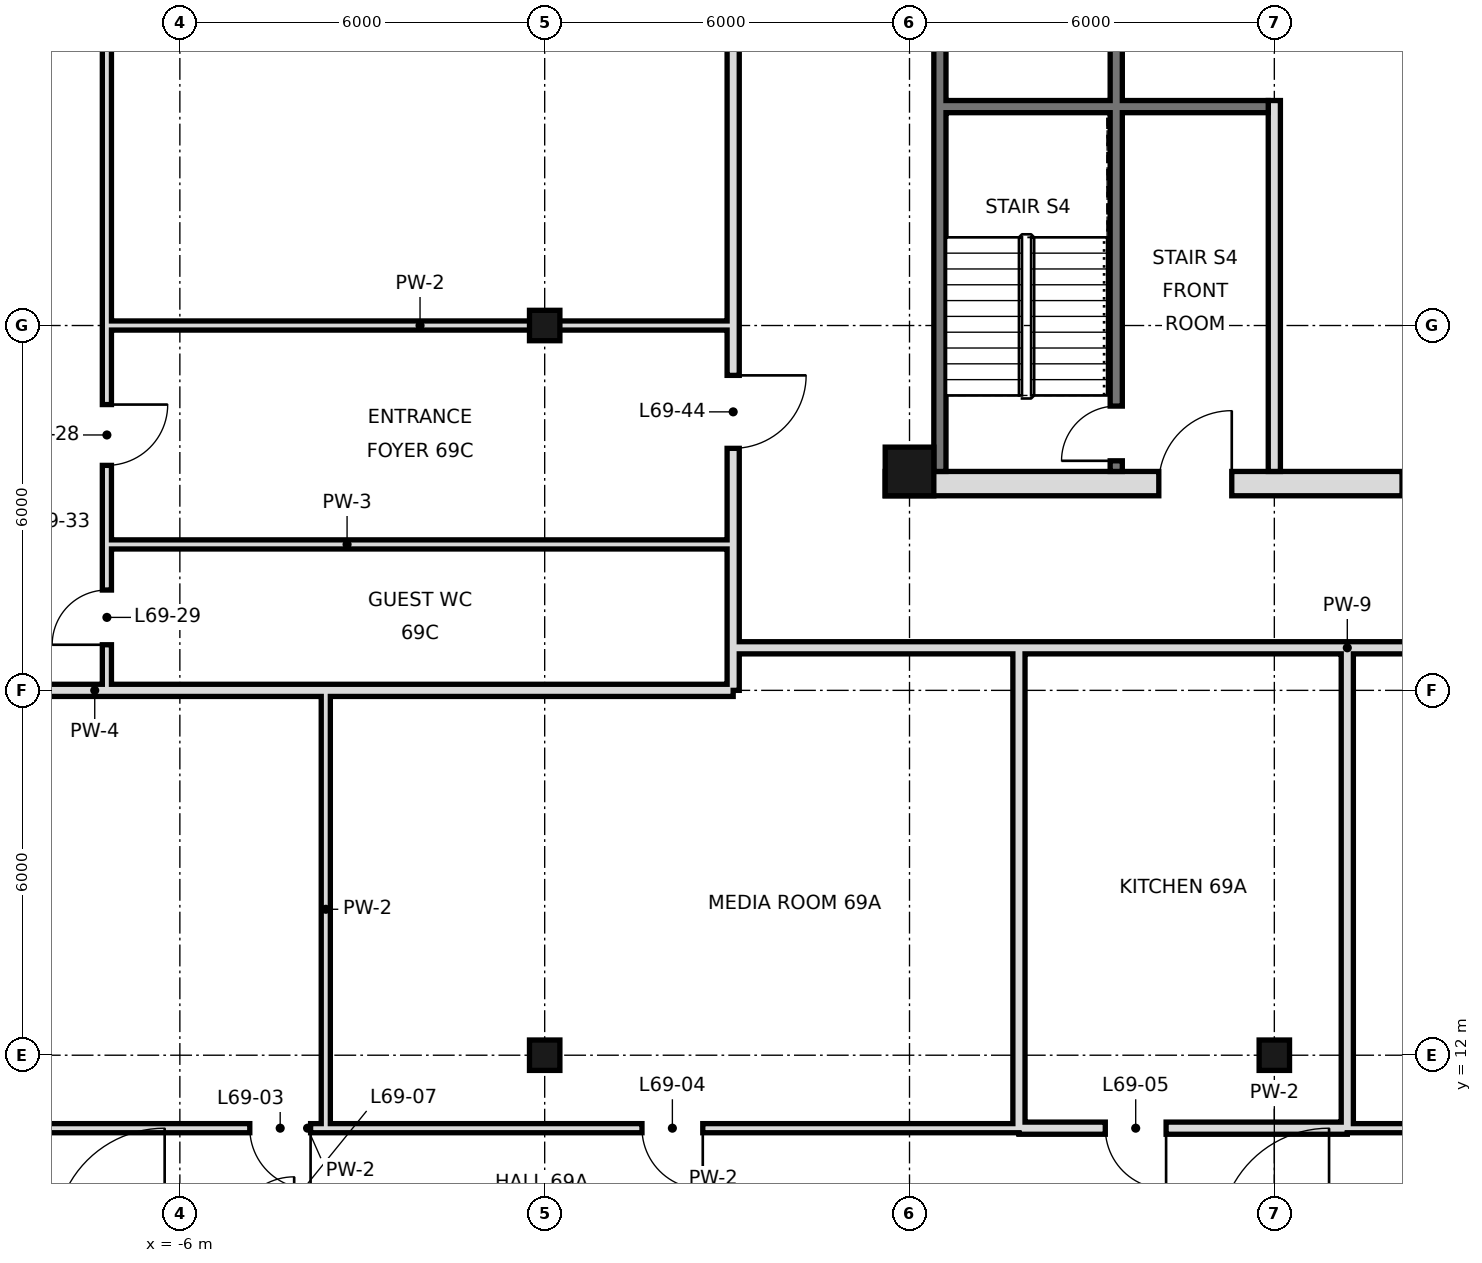
"""IFC4 building model, lengths in metres.
Left out: names, types, materials, properties, quantities, classifications, styles, units other than length and angle.
Written with IfcOpenShell. Run it as: python <this file> out.ifc"""

import sys

from ifc_helpers import new_model, si_unit, direction, frame, frame_2d, origin, origin_2d, place, context, subcontext, project, spatial, rectangle, hollow_rectangle, extrude, element, fill, save


model = new_model("IFC4")
c1 = context("Model", 3, precision=1e-05, world=origin(), true_north=direction((0.0, 1.0)))
c2 = subcontext(c1, "Body", "Model", "MODEL_VIEW")
j1 = project(units=[si_unit("LENGTHUNIT", "METRE"), si_unit("PLANEANGLEUNIT", "RADIAN")], contexts=[c1])
p1 = place(None, origin())
s1 = spatial("IfcSite", under=j1, at=p1, CompositionType="ELEMENT")
p2 = place(p1, origin())
s2 = spatial("IfcBuilding", under=s1, at=p2, CompositionType="ELEMENT")
p3 = place(p2, frame((0.0, 0.0, 294.4)))
s3 = spatial("IfcBuildingStorey", under=s2, at=p3, CompositionType="ELEMENT", Elevation=294.4)
for number, where, z_axis, x_axis in (
    (1, (0.0, 12.0, 0.0), (0.0, 0.0, 1.0), (1.0, 0.0, 0.0)),
    (2, (0.0, 24.0, 0.0), (0.0, 0.0, 1.0), (1.0, 0.0, 0.0)),
):
    element("IfcColumn", number, at=place(p3, frame(where, z_axis=z_axis, x_axis=x_axis)), inside=s3, PredefinedType="COLUMN", context=c2, shape_type="SweptSolid", body=[
        extrude(hollow_rectangle(XDim=0.5, YDim=0.5, WallThickness=0.025, at=origin_2d()), origin(), (0.0, 0.0, 1.0), 3.6),
    ])
p4 = place(p3, frame((6.0, 21.6, 0.0), z_axis=(0.0, 0.0, 1.0), x_axis=(1.0, 0.0, 0.0)))
e3 = element("IfcColumn", 3, at=p4, inside=s3, PredefinedType="COLUMN", context=c2, shape_type="SweptSolid", body=[
    extrude(hollow_rectangle(XDim=0.8, YDim=0.8, WallThickness=0.032, at=origin_2d()), origin(), (0.0, 0.0, 1.0), 3.6),
])
p5 = place(p3, frame((12.0, 12.0, 0.0), z_axis=(0.0, 0.0, 1.0), x_axis=(1.0, 0.0, 0.0)))
e4 = element("IfcColumn", 4, at=p5, inside=s3, PredefinedType="COLUMN", context=c2, shape_type="SweptSolid", body=[
    extrude(hollow_rectangle(XDim=0.5, YDim=0.5, WallThickness=0.025, at=origin_2d()), origin(), (0.0, 0.0, 1.0), 3.6),
])
p6 = place(p3, frame((-3.6, 10.8, 0.0), z_axis=(0.0, 0.0, 1.0), x_axis=(0.0, 1.0, 0.0)))
e5 = element("IfcWall", 5, at=p6, inside=s3, PredefinedType="PARTITIONING", context=c2, shape_type="SweptSolid", body=[
    extrude(rectangle(XDim=7.2, YDim=0.15, at=frame_2d((3.6, 0.0))), origin(), (0.0, 0.0, 1.0), 3.42),
])
p7 = place(p3, frame((-7.2, 20.4, 0.0), z_axis=(0.0, 0.0, 1.0), x_axis=(0.0, 1.0, 0.0)))
e6 = element("IfcWall", 6, at=p7, inside=s3, PredefinedType="PARTITIONING", context=c2, shape_type="SweptSolid", body=[
    extrude(rectangle(XDim=23.4, YDim=0.15, at=frame_2d((11.7, 0.0))), origin(), (0.0, 0.0, 1.0), 3.42),
])
p8 = place(p7, frame((1.3, 0.0, 0.0)))
e7 = element("IfcOpeningElement", 7, at=p8, cuts=e6, PredefinedType="OPENING", context=c2, shape_type="SweptSolid", body=[
    extrude(rectangle(XDim=1.0, YDim=2.4, at=frame_2d((0.5, 1.2))), frame((0.0, 0.085, 0.0), z_axis=(0.0, -1.0, 0.0), x_axis=(1.0, 0.0, 0.0)), (0.0, 0.0, 1.0), 0.17),
])
p9 = place(p7, frame((11.2, 0.0, 0.0)))
e8 = element("IfcOpeningElement", 8, at=p9, cuts=e6, PredefinedType="OPENING", context=c2, shape_type="SweptSolid", body=[
    extrude(rectangle(XDim=1.0, YDim=2.4, at=frame_2d((0.5, 1.2))), frame((0.0, 0.085, 0.0), z_axis=(0.0, -1.0, 0.0), x_axis=(1.0, 0.0, 0.0)), (0.0, 0.0, 1.0), 0.17),
])
p10 = place(p7, frame((17.74, 0.0, 0.0)))
e9 = element("IfcOpeningElement", 9, at=p10, cuts=e6, PredefinedType="OPENING", context=c2, shape_type="SweptSolid", body=[
    extrude(rectangle(XDim=1.0, YDim=2.4, at=frame_2d((0.5, 1.2))), frame((0.0, 0.085, 0.0), z_axis=(0.0, -1.0, 0.0), x_axis=(1.0, 0.0, 0.0)), (0.0, 0.0, 1.0), 0.17),
])
p11 = place(p3, frame((-7.2, 18.0, 0.0), z_axis=(0.0, 0.0, 1.0), x_axis=(0.0, 1.0, 0.0)))
e10 = element("IfcWall", 10, at=p11, inside=s3, PredefinedType="PARTITIONING", context=c2, shape_type="SweptSolid", body=[
    extrude(rectangle(XDim=2.4, YDim=0.15, at=frame_2d((1.2, 0.0))), origin(), (0.0, 0.0, 1.0), 3.42),
])
p12 = place(p11, frame((0.75, 0.0, 0.0)))
e11 = element("IfcOpeningElement", 11, at=p12, cuts=e10, PredefinedType="OPENING", context=c2, shape_type="SweptSolid", body=[
    extrude(rectangle(XDim=0.9, YDim=2.4, at=frame_2d((0.45, 1.2))), frame((0.0, 0.085, 0.0), z_axis=(0.0, -1.0, 0.0), x_axis=(1.0, 0.0, 0.0)), (0.0, 0.0, 1.0), 0.17),
])
p13 = place(p3, frame((13.2, 10.8, 0.0), z_axis=(0.0, 0.0, 1.0), x_axis=(0.0, 1.0, 0.0)))
e12 = element("IfcWall", 12, at=p13, inside=s3, PredefinedType="SOLIDWALL", context=c2, shape_type="SweptSolid", body=[
    extrude(rectangle(XDim=7.9, YDim=0.2, at=frame_2d((3.95, 0.0))), origin(), (0.0, 0.0, 1.0), 2.72),
])
p14 = place(p3, frame((3.1, 18.7, 0.0), z_axis=(0.0, 0.0, 1.0), x_axis=(0.0, 1.0, 0.0)))
e13 = element("IfcWall", 13, at=p14, inside=s3, PredefinedType="SOLIDWALL", context=c2, shape_type="SweptSolid", body=[
    extrude(rectangle(XDim=25.1, YDim=0.2, at=frame_2d((12.55, 0.0))), origin(), (0.0, 0.0, 1.0), 2.97),
])
p15 = place(p14, frame((3.28, 0.0, 0.0)))
e14 = element("IfcOpeningElement", 14, at=p15, cuts=e13, PredefinedType="OPENING", context=c2, shape_type="SweptSolid", body=[
    extrude(rectangle(XDim=1.2, YDim=2.4, at=frame_2d((0.6, 1.2))), frame((0.0, 0.11, 0.0), z_axis=(0.0, -1.0, 0.0), x_axis=(1.0, 0.0, 0.0)), (0.0, 0.0, 1.0), 0.22),
])
p16 = place(p3, frame((3.1, 18.0, 0.0), z_axis=(0.0, 0.0, 1.0), x_axis=(0.0, 1.0, 0.0)))
e15 = element("IfcWall", 15, at=p16, inside=s3, PredefinedType="SOLIDWALL", context=c2, shape_type="SweptSolid", body=[
    extrude(rectangle(XDim=0.7, YDim=0.2, at=frame_2d((0.35, 0.0))), origin(), (0.0, 0.0, 1.0), 2.97),
])
p17 = place(p3, frame((7.8, 10.8, 0.0), z_axis=(0.0, 0.0, 1.0), x_axis=(0.0, 1.0, 0.0)))
e16 = element("IfcWall", 16, at=p17, inside=s3, PredefinedType="SOLIDWALL", context=c2, shape_type="SweptSolid", body=[
    extrude(rectangle(XDim=7.9, YDim=0.2, at=frame_2d((3.95, 0.0))), origin(), (0.0, 0.0, 1.0), 2.72),
])
p18 = place(p3, frame((7.8, 10.8, 0.0), z_axis=(0.0, 0.0, 1.0), x_axis=(1.0, 0.0, 0.0)))
e17 = element("IfcWall", 17, at=p18, inside=s3, PredefinedType="SOLIDWALL", context=c2, shape_type="SweptSolid", body=[
    extrude(rectangle(XDim=5.4, YDim=0.2, at=frame_2d((2.7, 0.0))), origin(), (0.0, 0.0, 1.0), 2.72),
])
p19 = place(p18, frame((1.42, 0.0, 0.0)))
e18 = element("IfcOpeningElement", 18, at=p19, cuts=e17, PredefinedType="OPENING", context=c2, shape_type="SweptSolid", body=[
    extrude(rectangle(XDim=1.0, YDim=2.4, at=frame_2d((0.5, 1.2))), frame((0.0, 0.11, 0.0), z_axis=(0.0, -1.0, 0.0), x_axis=(1.0, 0.0, 0.0)), (0.0, 0.0, 1.0), 0.22),
])
p20 = place(p3, frame((-15.6, 10.8, 0.0), z_axis=(0.0, 0.0, 1.0), x_axis=(1.0, 0.0, 0.0)))
e19 = element("IfcWall", 19, at=p20, inside=s3, PredefinedType="PARTITIONING", context=c2, shape_type="SweptSolid", body=[
    extrude(rectangle(XDim=23.4, YDim=0.15, at=frame_2d((11.7, 0.0))), origin(), (0.0, 0.0, 1.0), 3.42),
])
p21 = place(p20, frame((10.75, 0.0, 0.0)))
e20 = element("IfcOpeningElement", 20, at=p21, cuts=e19, PredefinedType="OPENING", context=c2, shape_type="SweptSolid", body=[
    extrude(rectangle(XDim=1.0, YDim=2.4, at=frame_2d((0.5, 1.2))), frame((0.0, 0.085, 0.0), z_axis=(0.0, -1.0, 0.0), x_axis=(1.0, 0.0, 0.0)), (0.0, 0.0, 1.0), 0.17),
])
p22 = place(p20, frame((17.2, 0.0, 0.0)))
e21 = element("IfcOpeningElement", 21, at=p22, cuts=e19, PredefinedType="OPENING", context=c2, shape_type="SweptSolid", body=[
    extrude(rectangle(XDim=1.0, YDim=2.4, at=frame_2d((0.5, 1.2))), frame((0.0, 0.085, 0.0), z_axis=(0.0, -1.0, 0.0), x_axis=(1.0, 0.0, 0.0)), (0.0, 0.0, 1.0), 0.17),
])
p23 = place(p3, frame((13.2, 10.8, 0.0), z_axis=(0.0, 0.0, 1.0), x_axis=(1.0, 0.0, 0.0)))
e22 = element("IfcWall", 22, at=p23, inside=s3, PredefinedType="PARTITIONING", context=c2, shape_type="SweptSolid", body=[
    extrude(rectangle(XDim=27.6, YDim=0.15, at=frame_2d((13.8, 0.0))), origin(), (0.0, 0.0, 1.0), 3.42),
])
p24 = place(p23, frame((2.56, 0.0, 0.0)))
e23 = element("IfcOpeningElement", 23, at=p24, cuts=e22, PredefinedType="OPENING", context=c2, shape_type="SweptSolid", body=[
    extrude(rectangle(XDim=1.0, YDim=2.4, at=frame_2d((0.5, 1.2))), frame((0.0, 0.085, 0.0), z_axis=(0.0, -1.0, 0.0), x_axis=(1.0, 0.0, 0.0)), (0.0, 0.0, 1.0), 0.17),
])
p25 = place(p23, frame((16.12, 0.0, 0.0)))
e24 = element("IfcOpeningElement", 24, at=p25, cuts=e22, PredefinedType="OPENING", context=c2, shape_type="SweptSolid", body=[
    extrude(rectangle(XDim=1.0, YDim=2.4, at=frame_2d((0.5, 1.2))), frame((0.0, 0.085, 0.0), z_axis=(0.0, -1.0, 0.0), x_axis=(1.0, 0.0, 0.0)), (0.0, 0.0, 1.0), 0.17),
])
p26 = place(p23, frame((9.1, 0.0, 0.0)))
e25 = element("IfcOpeningElement", 25, at=p26, cuts=e22, PredefinedType="OPENING", context=c2, shape_type="SweptSolid", body=[
    extrude(rectangle(XDim=1.0, YDim=2.4, at=frame_2d((0.5, 1.2))), frame((0.0, 0.085, 0.0), z_axis=(0.0, -1.0, 0.0), x_axis=(1.0, 0.0, 0.0)), (0.0, 0.0, 1.0), 0.17),
])
p27 = place(p23, frame((20.68, 0.0, 0.0)))
e26 = element("IfcOpeningElement", 26, at=p27, cuts=e22, PredefinedType="OPENING", context=c2, shape_type="SweptSolid", body=[
    extrude(rectangle(XDim=1.0, YDim=2.4, at=frame_2d((0.5, 1.2))), frame((0.0, 0.085, 0.0), z_axis=(0.0, -1.0, 0.0), x_axis=(1.0, 0.0, 0.0)), (0.0, 0.0, 1.0), 0.17),
])
p28 = place(p3, frame((-18.6, 18.0, 0.0), z_axis=(0.0, 0.0, 1.0), x_axis=(1.0, 0.0, 0.0)))
e27 = element("IfcWall", 27, at=p28, inside=s3, PredefinedType="SOLIDWALL", context=c2, shape_type="SweptSolid", body=[
    extrude(rectangle(XDim=21.7, YDim=0.2, at=frame_2d((10.85, 0.0))), origin(), (0.0, 0.0, 1.0), 2.72),
])
p29 = place(p3, frame((3.1, 18.7, 0.0), z_axis=(0.0, 0.0, 1.0), x_axis=(1.0, 0.0, 0.0)))
e28 = element("IfcWall", 28, at=p29, inside=s3, PredefinedType="SOLIDWALL", context=c2, shape_type="SweptSolid", body=[
    extrude(rectangle(XDim=4.7, YDim=0.2, at=frame_2d((2.35, 0.0))), origin(), (0.0, 0.0, 1.0), 2.72),
])
p30 = place(p3, frame((13.2, 18.7, 0.0), z_axis=(0.0, 0.0, 1.0), x_axis=(1.0, 0.0, 0.0)))
e29 = element("IfcWall", 29, at=p30, inside=s3, PredefinedType="SOLIDWALL", context=c2, shape_type="SweptSolid", body=[
    extrude(rectangle(XDim=27.6, YDim=0.2, at=frame_2d((13.8, 0.0))), origin(), (0.0, 0.0, 1.0), 2.72),
])
p31 = place(p30, frame((1.8, 0.0, 0.0)))
e30 = element("IfcOpeningElement", 30, at=p31, cuts=e29, PredefinedType="OPENING", context=c2, shape_type="SweptSolid", body=[
    extrude(rectangle(XDim=1.2, YDim=2.4, at=frame_2d((0.6, 1.2))), frame((0.0, 0.11, 0.0), z_axis=(0.0, -1.0, 0.0), x_axis=(1.0, 0.0, 0.0)), (0.0, 0.0, 1.0), 0.22),
])
p32 = place(p30, frame((15.98, 0.0, 0.0)))
e31 = element("IfcOpeningElement", 31, at=p32, cuts=e29, PredefinedType="OPENING", context=c2, shape_type="SweptSolid", body=[
    extrude(rectangle(XDim=1.2, YDim=2.4, at=frame_2d((0.6, 1.2))), frame((0.0, 0.11, 0.0), z_axis=(0.0, -1.0, 0.0), x_axis=(1.0, 0.0, 0.0)), (0.0, 0.0, 1.0), 0.22),
])
p33 = place(p3, frame((7.8, 18.7, 0.0), z_axis=(0.0, 0.0, 1.0), x_axis=(1.0, 0.0, 0.0)))
e32 = element("IfcWall", 32, at=p33, inside=s3, PredefinedType="SOLIDWALL", context=c2, shape_type="SweptSolid", body=[
    extrude(rectangle(XDim=5.4, YDim=0.2, at=frame_2d((2.7, 0.0))), origin(), (0.0, 0.0, 1.0), 3.42),
])
p34 = place(p3, frame((-7.2, 20.4, 0.0), z_axis=(0.0, 0.0, 1.0), x_axis=(1.0, 0.0, 0.0)))
e33 = element("IfcWall", 33, at=p34, inside=s3, PredefinedType="PARTITIONING", context=c2, shape_type="SweptSolid", body=[
    extrude(rectangle(XDim=10.3, YDim=0.15, at=frame_2d((5.15, 0.0))), origin(), (0.0, 0.0, 1.0), 3.42),
])
p35 = place(p3, frame((-7.2, 24.0, 0.0), z_axis=(0.0, 0.0, 1.0), x_axis=(1.0, 0.0, 0.0)))
e34 = element("IfcWall", 34, at=p35, inside=s3, PredefinedType="PARTITIONING", context=c2, shape_type="SweptSolid", body=[
    extrude(rectangle(XDim=10.3, YDim=0.15, at=frame_2d((5.15, 0.0))), origin(), (0.0, 0.0, 1.0), 2.72),
])
p36 = place(p3, frame((6.5, 21.6, 0.0), z_axis=(0.0, 0.0, 1.0), x_axis=(0.0, 1.0, 0.0)))
e35 = element("IfcWall", 35, at=p36, inside=s3, PredefinedType="SOLIDWALL", context=c2, shape_type="SweptSolid", body=[
    extrude(rectangle(XDim=23.5, YDim=0.2, at=frame_2d((11.75, 0.0))), origin(), (0.0, 0.0, 1.0), 3.42),
])
p37 = place(p3, frame((5.6, 21.4, 0.0), z_axis=(0.0, 0.0, 1.0), x_axis=(1.0, 0.0, 0.0)))
e36 = element("IfcWall", 36, at=p37, inside=s3, PredefinedType="SOLIDWALL", context=c2, shape_type="SweptSolid", body=[
    extrude(rectangle(XDim=36.8, YDim=0.4, at=frame_2d((18.4, 0.0))), origin(), (0.0, 0.0, 1.0), 3.42),
])
p38 = place(p37, frame((8.5, 0.0, 0.0)))
e37 = element("IfcOpeningElement", 37, at=p38, cuts=e36, PredefinedType="OPENING", context=c2, shape_type="SweptSolid", body=[
    extrude(rectangle(XDim=1.8, YDim=2.1, at=frame_2d((0.9, 1.05))), frame((0.0, 0.21, 0.0), z_axis=(0.0, -1.0, 0.0), x_axis=(1.0, 0.0, 0.0)), (0.0, 0.0, 1.0), 0.42),
])
p39 = place(p37, frame((17.5, 0.0, 0.0)))
e38 = element("IfcOpeningElement", 38, at=p39, cuts=e36, PredefinedType="OPENING", context=c2, shape_type="SweptSolid", body=[
    extrude(rectangle(XDim=1.8, YDim=2.1, at=frame_2d((0.9, 1.05))), frame((0.0, 0.21, 0.0), z_axis=(0.0, -1.0, 0.0), x_axis=(1.0, 0.0, 0.0)), (0.0, 0.0, 1.0), 0.42),
])
p40 = place(p37, frame((26.5, 0.0, 0.0)))
e39 = element("IfcOpeningElement", 39, at=p40, cuts=e36, PredefinedType="OPENING", context=c2, shape_type="SweptSolid", body=[
    extrude(rectangle(XDim=1.8, YDim=2.1, at=frame_2d((0.9, 1.05))), frame((0.0, 0.21, 0.0), z_axis=(0.0, -1.0, 0.0), x_axis=(1.0, 0.0, 0.0)), (0.0, 0.0, 1.0), 0.42),
])
p41 = place(p37, frame((4.5, 0.0, 0.0)))
e40 = element("IfcOpeningElement", 40, at=p41, cuts=e36, PredefinedType="OPENING", context=c2, shape_type="SweptSolid", body=[
    extrude(rectangle(XDim=1.2, YDim=2.1, at=frame_2d((0.6, 1.05))), frame((0.0, 0.21, 0.0), z_axis=(0.0, -1.0, 0.0), x_axis=(1.0, 0.0, 0.0)), (0.0, 0.0, 1.0), 0.42),
])
p42 = place(p37, frame((31.1, 0.0, 0.0)))
e41 = element("IfcOpeningElement", 41, at=p42, cuts=e36, PredefinedType="OPENING", context=c2, shape_type="SweptSolid", body=[
    extrude(rectangle(XDim=1.2, YDim=2.1, at=frame_2d((0.6, 1.05))), frame((0.0, 0.21, 0.0), z_axis=(0.0, -1.0, 0.0), x_axis=(1.0, 0.0, 0.0)), (0.0, 0.0, 1.0), 0.42),
])
p43 = place(p3, frame((12.0, 21.6, 0.0), z_axis=(0.0, 0.0, 1.0), x_axis=(0.0, 1.0, 0.0)))
e42 = element("IfcWall", 42, at=p43, inside=s3, PredefinedType="PARTITIONING", context=c2, shape_type="SweptSolid", body=[
    extrude(rectangle(XDim=6.1, YDim=0.2, at=frame_2d((3.05, 0.0))), origin(), (0.0, 0.0, 1.0), 3.42),
])
p44 = place(p3, frame((9.4, 21.6, 0.0), z_axis=(0.0, 0.0, 1.0), x_axis=(0.0, 1.0, 0.0)))
e43 = element("IfcWall", 43, at=p44, inside=s3, PredefinedType="SOLIDWALL", context=c2, shape_type="SweptSolid", body=[
    extrude(rectangle(XDim=23.4, YDim=0.2, at=frame_2d((11.7, 0.0))), origin(), (0.0, 0.0, 1.0), 3.42),
])
p45 = place(p44, frame((7.7, 0.0, 0.0)))
e44 = element("IfcOpeningElement", 44, at=p45, cuts=e43, PredefinedType="OPENING", context=c2, shape_type="SweptSolid", body=[
    extrude(rectangle(XDim=1.0, YDim=2.1, at=frame_2d((0.5, 1.05))), frame((0.0, 0.11, 0.0), z_axis=(0.0, -1.0, 0.0), x_axis=(1.0, 0.0, 0.0)), (0.0, 0.0, 1.0), 0.22),
])
p46 = place(p44, frame((12.35, 0.0, 0.0)))
e45 = element("IfcOpeningElement", 45, at=p46, cuts=e43, PredefinedType="OPENING", context=c2, shape_type="SweptSolid", body=[
    extrude(rectangle(XDim=1.0, YDim=2.1, at=frame_2d((0.5, 1.05))), frame((0.0, 0.11, 0.0), z_axis=(0.0, -1.0, 0.0), x_axis=(1.0, 0.0, 0.0)), (0.0, 0.0, 1.0), 0.22),
])
p47 = place(p44, frame((22.1, 0.0, 0.0)))
e46 = element("IfcOpeningElement", 46, at=p47, cuts=e43, PredefinedType="OPENING", context=c2, shape_type="SweptSolid", body=[
    extrude(rectangle(XDim=1.0, YDim=2.1, at=frame_2d((0.5, 1.05))), frame((0.0, 0.11, 0.0), z_axis=(0.0, -1.0, 0.0), x_axis=(1.0, 0.0, 0.0)), (0.0, 0.0, 1.0), 0.22),
])
p48 = place(p44, frame((0.175, 0.0, 0.0)))
e47 = element("IfcOpeningElement", 47, at=p48, cuts=e43, PredefinedType="OPENING", context=c2, shape_type="SweptSolid", body=[
    extrude(rectangle(XDim=0.9, YDim=2.1, at=frame_2d((0.45, 1.05))), frame((0.0, 0.11, 0.0), z_axis=(0.0, -1.0, 0.0), x_axis=(1.0, 0.0, 0.0)), (0.0, 0.0, 1.0), 0.22),
])
p49 = place(p3, frame((6.6, 27.6, 0.0), z_axis=(0.0, 0.0, 1.0), x_axis=(1.0, 0.0, 0.0)))
e48 = element("IfcWall", 48, at=p49, inside=s3, PredefinedType="SOLIDWALL", context=c2, shape_type="SweptSolid", body=[
    extrude(rectangle(XDim=5.3, YDim=0.2, at=frame_2d((2.65, 0.0))), origin(), (0.0, 0.0, 1.0), 3.42),
])
p50 = place(p21, origin())
e49 = element("IfcDoor", 49, at=p50, inside=s3, OperationType="SINGLE_SWING_RIGHT", PredefinedType="DOOR", context=c2, shape_type="SweptSolid", body=[
    extrude(rectangle(XDim=1.0, YDim=2.4, at=frame_2d((0.5, 1.2))), frame((0.0, 0.025, 0.0), z_axis=(0.0, -1.0, 0.0), x_axis=(1.0, 0.0, 0.0)), (0.0, 0.0, 1.0), 0.05),
])
fill(e20, e49)
p51 = place(p22, origin())
e50 = element("IfcDoor", 50, at=p51, inside=s3, OperationType="SINGLE_SWING_RIGHT", PredefinedType="DOOR", context=c2, shape_type="SweptSolid", body=[
    extrude(rectangle(XDim=1.0, YDim=2.4, at=frame_2d((0.5, 1.2))), frame((0.0, 0.025, 0.0), z_axis=(0.0, -1.0, 0.0), x_axis=(1.0, 0.0, 0.0)), (0.0, 0.0, 1.0), 0.05),
])
fill(e21, e50)
p52 = place(p19, origin())
e51 = element("IfcDoor", 51, at=p52, inside=s3, OperationType="SINGLE_SWING_RIGHT", PredefinedType="DOOR", context=c2, shape_type="SweptSolid", body=[
    extrude(rectangle(XDim=1.0, YDim=2.4, at=frame_2d((0.5, 1.2))), frame((0.0, 0.025, 0.0), z_axis=(0.0, -1.0, 0.0), x_axis=(1.0, 0.0, 0.0)), (0.0, 0.0, 1.0), 0.05),
])
fill(e18, e51)
p53 = place(p8, origin())
e52 = element("IfcDoor", 52, at=p53, inside=s3, OperationType="SINGLE_SWING_RIGHT", PredefinedType="DOOR", context=c2, shape_type="SweptSolid", body=[
    extrude(rectangle(XDim=1.0, YDim=2.4, at=frame_2d((0.5, 1.2))), frame((0.0, 0.025, 0.0), z_axis=(0.0, -1.0, 0.0), x_axis=(1.0, 0.0, 0.0)), (0.0, 0.0, 1.0), 0.05),
])
fill(e7, e52)
p54 = place(p12, origin())
e53 = element("IfcDoor", 53, at=p54, inside=s3, OperationType="SINGLE_SWING_LEFT", PredefinedType="DOOR", context=c2, shape_type="SweptSolid", body=[
    extrude(rectangle(XDim=0.9, YDim=2.4, at=frame_2d((0.45, 1.2))), frame((0.0, 0.025, 0.0), z_axis=(0.0, -1.0, 0.0), x_axis=(1.0, 0.0, 0.0)), (0.0, 0.0, 1.0), 0.05),
])
fill(e11, e53)
p55 = place(p15, origin())
e54 = element("IfcDoor", 54, at=p55, inside=s3, OperationType="SINGLE_SWING_RIGHT", PredefinedType="DOOR", context=c2, shape_type="SweptSolid", body=[
    extrude(rectangle(XDim=1.2, YDim=2.4, at=frame_2d((0.6, 1.2))), frame((0.0, 0.025, 0.0), z_axis=(0.0, -1.0, 0.0), x_axis=(1.0, 0.0, 0.0)), (0.0, 0.0, 1.0), 0.05),
])
fill(e14, e54)
p56 = place(p41, frame((1.2, 0.0, 0.0), z_axis=(0.0, 0.0, 1.0), x_axis=(-1.0, 0.0, 0.0)))
e55 = element("IfcDoor", 55, at=p56, inside=s3, OperationType="SINGLE_SWING_LEFT", PredefinedType="DOOR", context=c2, shape_type="SweptSolid", body=[
    extrude(rectangle(XDim=1.2, YDim=2.1, at=frame_2d((0.6, 1.05))), frame((0.0, 0.025, 0.0), z_axis=(0.0, -1.0, 0.0), x_axis=(1.0, 0.0, 0.0)), (0.0, 0.0, 1.0), 0.05),
])
fill(e40, e55)
p57 = place(p48, origin())
e56 = element("IfcDoor", 56, at=p57, inside=s3, OperationType="SINGLE_SWING_LEFT", PredefinedType="DOOR", context=c2, shape_type="SweptSolid", body=[
    extrude(rectangle(XDim=0.9, YDim=2.1, at=frame_2d((0.45, 1.05))), frame((0.0, 0.025, 0.0), z_axis=(0.0, -1.0, 0.0), x_axis=(1.0, 0.0, 0.0)), (0.0, 0.0, 1.0), 0.05),
])
fill(e47, e56)
save(model, sys.argv[1])
